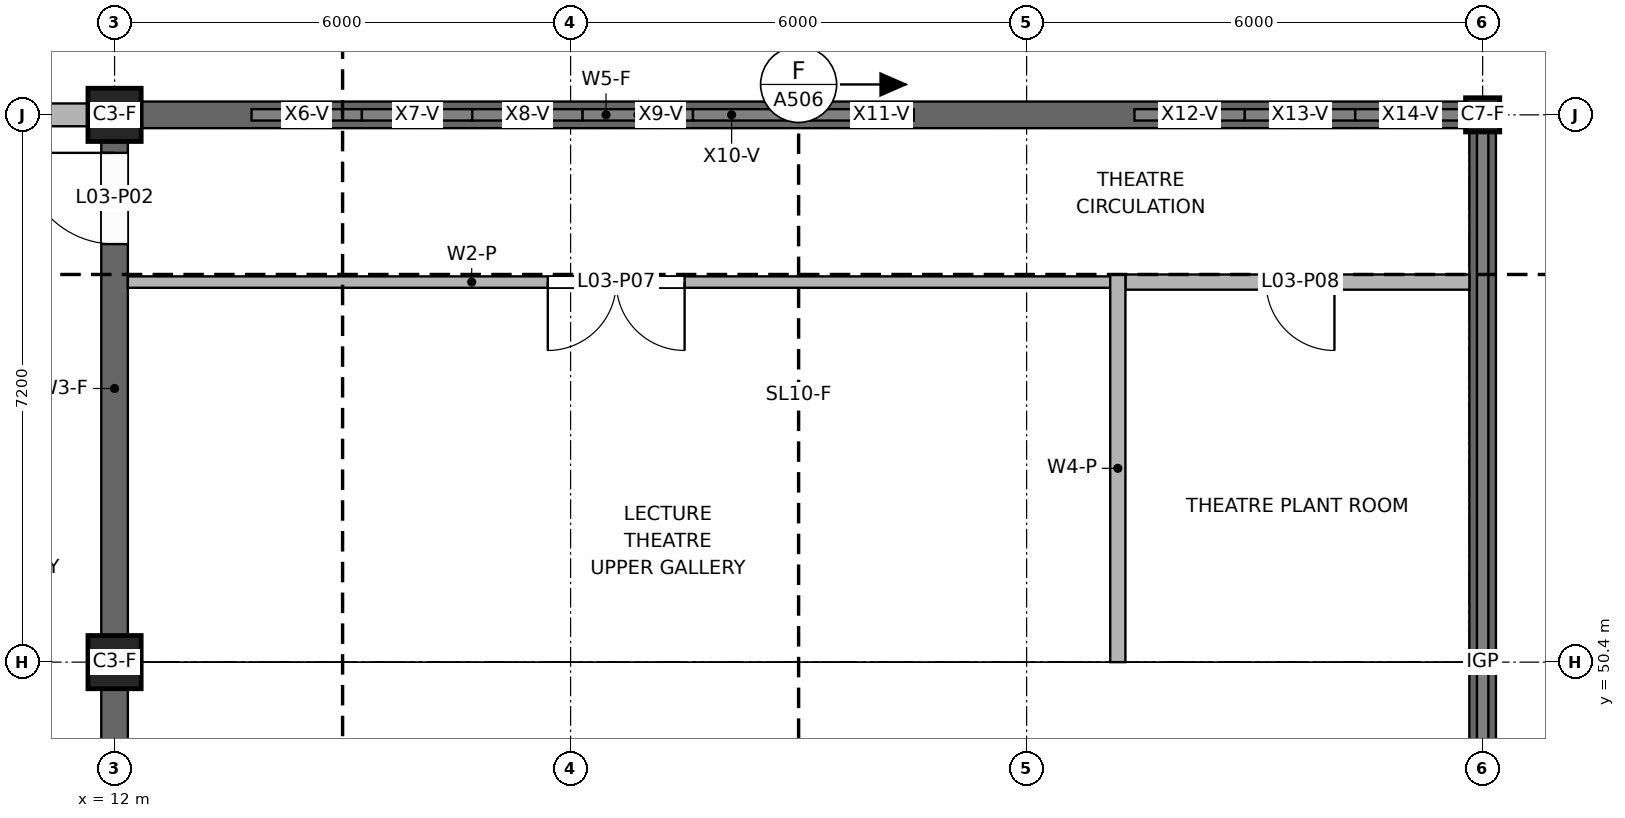
"""IFC4 building model, lengths in metres.
Left out: names, types, materials, properties, quantities, classifications, styles, units other than length and angle.
Written with IfcOpenShell. Run it as: python <this file> out.ifc"""

import sys

from ifc_helpers import new_model, si_unit, direction, frame, frame_2d, origin, origin_2d, place, context, subcontext, project, spatial, rectangle, extrude, element, fill, save


model = new_model("IFC4")
c1 = context("Model", 3, precision=1e-05, world=origin(), true_north=direction((0.0, 1.0)))
c2 = subcontext(c1, "Body", "Model", "MODEL_VIEW")
j1 = project(units=[si_unit("LENGTHUNIT", "METRE"), si_unit("PLANEANGLEUNIT", "RADIAN")], contexts=[c1])
p1 = place(None, origin())
s1 = spatial("IfcSite", under=j1, at=p1, CompositionType="ELEMENT")
p2 = place(p1, origin())
s2 = spatial("IfcBuilding", under=s1, at=p2, CompositionType="ELEMENT")
p3 = place(p2, frame((0.0, 0.0, 12.6)))
s3 = spatial("IfcBuildingStorey", under=s2, at=p3, CompositionType="ELEMENT", Elevation=12.6)
for number, where, z_axis, x_axis in (
    (1, (12.0, 50.4, 0.0), (0.0, 0.0, 1.0), (1.0, 0.0, 0.0)),
    (2, (12.0, 57.6, 0.0), (0.0, 0.0, 1.0), (1.0, 0.0, 0.0)),
):
    element("IfcColumn", number, at=place(p3, frame(where, z_axis=z_axis, x_axis=x_axis)), inside=s3, PredefinedType="COLUMN", context=c2, shape_type="SweptSolid", body=[
        extrude(rectangle(XDim=0.7, YDim=0.7, at=origin_2d()), origin(), (0.0, 0.0, 1.0), 4.0),
    ])
p4 = place(p3, frame((30.0, 35.825, 0.0), z_axis=(0.0, 0.0, 1.0), x_axis=(0.0, 1.0, 0.0)))
e3 = element("IfcWall", 3, at=p4, inside=s3, PredefinedType="SHEAR", context=c2, shape_type="SweptSolid", body=[
    extrude(rectangle(XDim=21.95, YDim=0.35, at=frame_2d((10.975, 0.0))), origin(), (0.0, 0.0, 1.0), 3.15),
])
p5 = place(p3, frame((12.0, 43.55, 0.0), z_axis=(0.0, 0.0, 1.0), x_axis=(0.0, 1.0, 0.0)))
e4 = element("IfcWall", 4, at=p5, inside=s3, PredefinedType="SHEAR", context=c2, shape_type="SweptSolid", body=[
    extrude(rectangle(XDim=6.5, YDim=0.35, at=frame_2d((3.25, 0.0))), origin(), (0.0, 0.0, 1.0), 3.1),
])
p6 = place(p3, frame((12.0, 50.75, 0.0), z_axis=(0.0, 0.0, 1.0), x_axis=(0.0, 1.0, 0.0)))
e5 = element("IfcWall", 5, at=p6, inside=s3, PredefinedType="SHEAR", context=c2, shape_type="SweptSolid", body=[
    extrude(rectangle(XDim=6.5, YDim=0.35, at=frame_2d((3.25, 0.0))), origin(), (0.0, 0.0, 1.0), 3.1),
])
p7 = place(p6, frame((5.15, 0.0, 0.0)))
e6 = element("IfcOpeningElement", 6, at=p7, cuts=e5, PredefinedType="OPENING", context=c2, shape_type="SweptSolid", body=[
    extrude(rectangle(XDim=1.2, YDim=2.1, at=frame_2d((0.6, 1.05))), frame((0.0, 0.185, 0.0), z_axis=(0.0, -1.0, 0.0), x_axis=(1.0, 0.0, 0.0)), (0.0, 0.0, 1.0), 0.37),
])
p8 = place(p3, frame((12.35, 57.6, 0.0), z_axis=(0.0, 0.0, 1.0), x_axis=(1.0, 0.0, 0.0)))
e7 = element("IfcWall", 7, at=p8, inside=s3, PredefinedType="SHEAR", context=c2, shape_type="SweptSolid", body=[
    extrude(rectangle(XDim=17.475, YDim=0.35, at=frame_2d((8.737, 0.0))), origin(), (0.0, 0.0, 1.0), 3.158),
])
p9 = place(p3, frame((30.0, 57.6, 3.15), z_axis=(0.0, 0.0, 1.0), x_axis=(1.0, 0.0, 0.0)))
e8 = element("IfcColumn", 8, at=p9, inside=s3, PredefinedType="COLUMN", context=c2, shape_type="SweptSolid", body=[
    extrude(rectangle(XDim=0.45, YDim=0.45, at=origin_2d()), origin(), (0.0, 0.0, 1.0), 0.636),
])
p10 = place(p3, frame((6.0, 57.6, 0.0), z_axis=(0.0, 0.0, 1.0), x_axis=(1.0, 0.0, 0.0)))
e9 = element("IfcWall", 9, at=p10, inside=s3, PredefinedType="SOLIDWALL", context=c2, shape_type="SweptSolid", body=[
    extrude(rectangle(XDim=5.65, YDim=0.3, at=frame_2d((2.825, 0.0))), origin(), (0.0, 0.0, 1.0), 3.2),
])
p11 = place(p10, frame((1.065, 0.0, 0.9)))
e10 = element("IfcOpeningElement", 10, at=p11, cuts=e9, PredefinedType="OPENING", context=c2, shape_type="SweptSolid", body=[
    extrude(rectangle(XDim=1.2, YDim=1.5, at=frame_2d((0.6, 0.75))), frame((0.0, 0.16, 0.0), z_axis=(0.0, -1.0, 0.0), x_axis=(1.0, 0.0, 0.0)), (0.0, 0.0, 1.0), 0.32),
])
p12 = place(p3, frame((25.2, 50.4, 0.0), z_axis=(0.0, 0.0, 1.0), x_axis=(0.0, 1.0, 0.0)))
e11 = element("IfcWall", 11, at=p12, inside=s3, PredefinedType="PARTITIONING", context=c2, shape_type="SweptSolid", body=[
    extrude(rectangle(XDim=5.1, YDim=0.2, at=frame_2d((2.55, 0.0))), origin(), (0.0, 0.0, 1.0), 3.15),
])
p13 = place(p3, frame((12.175, 55.4, 0.0), z_axis=(0.0, 0.0, 1.0), x_axis=(1.0, 0.0, 0.0)))
e12 = element("IfcWall", 12, at=p13, inside=s3, PredefinedType="PARTITIONING", context=c2, shape_type="SweptSolid", body=[
    extrude(rectangle(XDim=12.925, YDim=0.15, at=frame_2d((6.462, 0.0))), origin(), (0.0, 0.0, 1.0), 3.1),
])
p14 = place(p13, frame((5.525, 0.0, 0.0)))
e13 = element("IfcOpeningElement", 13, at=p14, cuts=e12, PredefinedType="OPENING", context=c2, shape_type="SweptSolid", body=[
    extrude(rectangle(XDim=1.8, YDim=2.1, at=frame_2d((0.9, 1.05))), frame((0.0, 0.085, 0.0), z_axis=(0.0, -1.0, 0.0), x_axis=(1.0, 0.0, 0.0)), (0.0, 0.0, 1.0), 0.17),
])
p15 = place(p3, frame((25.3, 55.4, 0.0), z_axis=(0.0, 0.0, 1.0), x_axis=(1.0, 0.0, 0.0)))
e14 = element("IfcWall", 14, at=p15, inside=s3, PredefinedType="PARTITIONING", context=c2, shape_type="SweptSolid", body=[
    extrude(rectangle(XDim=4.525, YDim=0.2, at=frame_2d((2.262, 0.0))), origin(), (0.0, 0.0, 1.0), 3.15),
])
p16 = place(p15, frame((1.85, 0.0, 0.0)))
e15 = element("IfcOpeningElement", 15, at=p16, cuts=e14, PredefinedType="OPENING", context=c2, shape_type="SweptSolid", body=[
    extrude(rectangle(XDim=0.9, YDim=2.1, at=frame_2d((0.45, 1.05))), frame((0.0, 0.11, 0.0), z_axis=(0.0, -1.0, 0.0), x_axis=(1.0, 0.0, 0.0)), (0.0, 0.0, 1.0), 0.22),
])
p17 = place(p7, origin())
e16 = element("IfcDoor", 16, at=p17, inside=s3, OperationType="SINGLE_SWING_RIGHT", PredefinedType="DOOR", context=c2, shape_type="SweptSolid", body=[
    extrude(rectangle(XDim=1.2, YDim=2.1, at=frame_2d((0.6, 1.05))), frame((0.0, 0.025, 0.0), z_axis=(0.0, -1.0, 0.0), x_axis=(1.0, 0.0, 0.0)), (0.0, 0.0, 1.0), 0.05),
])
fill(e6, e16)
p18 = place(p14, frame((1.8, 0.0, 0.0), z_axis=(0.0, 0.0, 1.0), x_axis=(-1.0, 0.0, 0.0)))
e17 = element("IfcDoor", 17, at=p18, inside=s3, OperationType="DOUBLE_DOOR_SINGLE_SWING", PredefinedType="DOOR", context=c2, shape_type="SweptSolid", body=[
    extrude(rectangle(XDim=1.8, YDim=2.1, at=frame_2d((0.9, 1.05))), frame((0.0, 0.025, 0.0), z_axis=(0.0, -1.0, 0.0), x_axis=(1.0, 0.0, 0.0)), (0.0, 0.0, 1.0), 0.05),
])
fill(e13, e17)
p19 = place(p16, frame((0.9, 0.0, 0.0), z_axis=(0.0, 0.0, 1.0), x_axis=(-1.0, 0.0, 0.0)))
e18 = element("IfcDoor", 18, at=p19, inside=s3, OperationType="SINGLE_SWING_LEFT", PredefinedType="DOOR", context=c2, shape_type="SweptSolid", body=[
    extrude(rectangle(XDim=0.9, YDim=2.1, at=frame_2d((0.45, 1.05))), frame((0.0, 0.025, 0.0), z_axis=(0.0, -1.0, 0.0), x_axis=(1.0, 0.0, 0.0)), (0.0, 0.0, 1.0), 0.05),
])
fill(e15, e18)
save(model, sys.argv[1])
